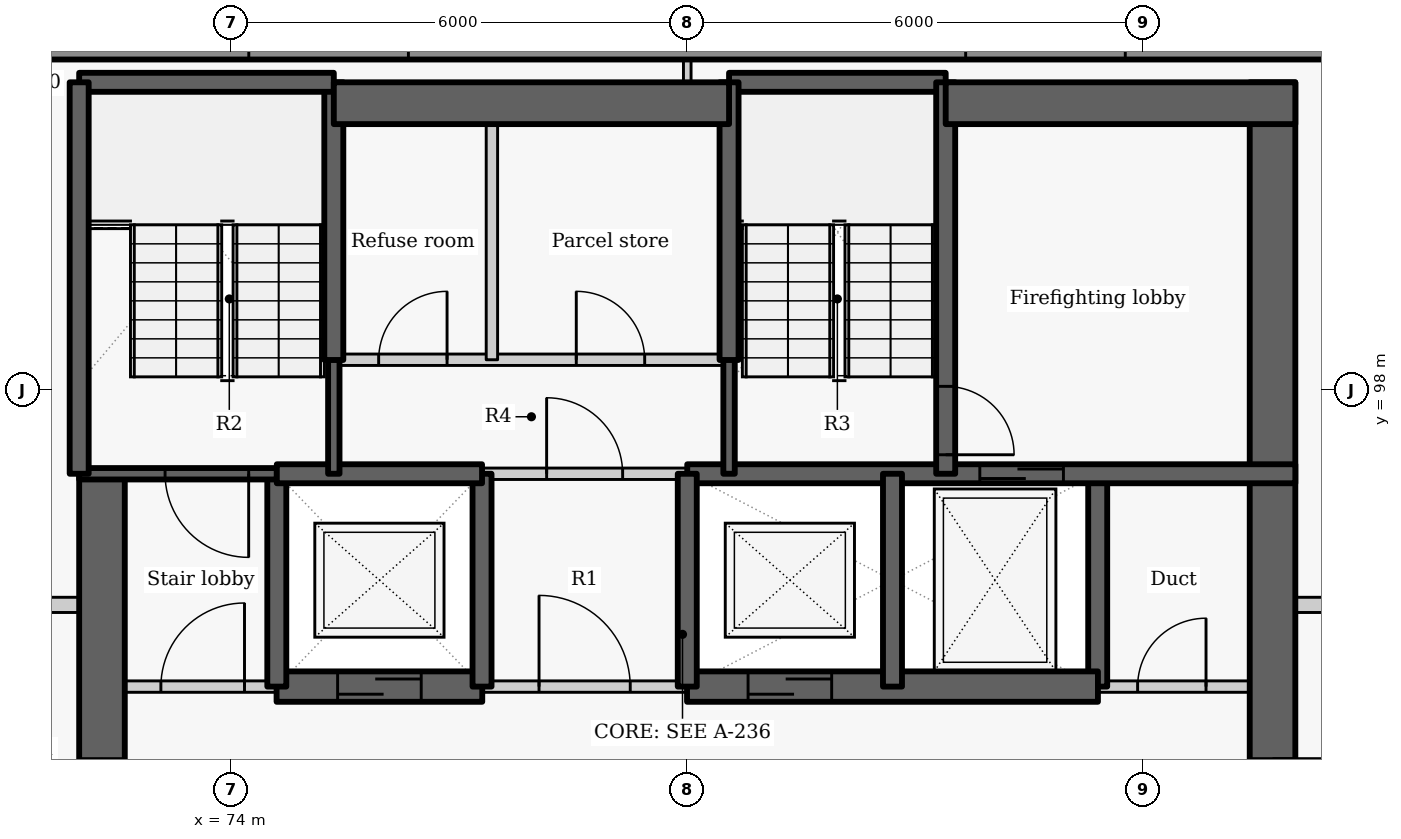
"""IFC4 building model, lengths in metres.
Left out: names, types, materials, properties, quantities, classifications, styles, units other than length and angle.
Written with IfcOpenShell. Run it as: python <this file> out.ifc"""

import sys

from ifc_helpers import new_model, si_unit, direction, frame, frame_2d, origin, place, context, subcontext, project, spatial, rectangle, extrude, element, fill, save


model = new_model("IFC4")
c1 = context("Model", 3, precision=1e-05, world=origin(), true_north=direction((0.0, 1.0)))
c2 = subcontext(c1, "Body", "Model", "MODEL_VIEW")
j1 = project(units=[si_unit("LENGTHUNIT", "METRE"), si_unit("PLANEANGLEUNIT", "RADIAN")], contexts=[c1])
p1 = place(None, origin())
s1 = spatial("IfcSite", under=j1, at=p1, CompositionType="ELEMENT")
p2 = place(p1, origin())
s2 = spatial("IfcBuilding", under=s1, at=p2, CompositionType="ELEMENT")
p3 = place(p2, frame((0.0, 0.0, 213.0)))
s3 = spatial("IfcBuildingStorey", under=s2, at=p3, CompositionType="ELEMENT", Elevation=213.0)
p4 = place(p3, frame((89.449, 102.5, 0.0), z_axis=(0.0, 0.0, 1.0), x_axis=(-1.0, 0.0, 0.0)))
e1 = element("IfcWall", 1, at=p4, inside=s3, PredefinedType="SOLIDWALL", context=c2, shape_type="SweptSolid", body=[
    extrude(rectangle(XDim=18.933, YDim=0.3, at=frame_2d((9.466, 0.0))), origin(), (0.0, 0.0, 1.0), 2.425),
])
p5 = place(p4, frame((3.687, 0.0, 0.9)))
e2 = element("IfcOpeningElement", 2, at=p5, cuts=e1, PredefinedType="OPENING", context=c2, shape_type="SweptSolid", body=[
    extrude(rectangle(XDim=2.1, YDim=1.1, at=frame_2d((1.05, 0.55))), frame((0.0, 0.16, 0.0), z_axis=(0.0, -1.0, 0.0), x_axis=(1.0, 0.0, 0.0)), (0.0, 0.0, 1.0), 0.32),
])
p6 = place(p4, frame((13.118, 0.0, 0.9)))
e3 = element("IfcOpeningElement", 3, at=p6, cuts=e1, PredefinedType="OPENING", context=c2, shape_type="SweptSolid", body=[
    extrude(rectangle(XDim=2.1, YDim=1.1, at=frame_2d((1.05, 0.55))), frame((0.0, 0.16, 0.0), z_axis=(0.0, -1.0, 0.0), x_axis=(1.0, 0.0, 0.0)), (0.0, 0.0, 1.0), 0.32),
])
p7 = place(p3, frame((72.3, 87.8, -0.275), z_axis=(0.0, 0.0, 1.0), x_axis=(0.0, 1.0, 0.0)))
e4 = element("IfcWall", 4, at=p7, inside=s3, PredefinedType="SHEAR", context=c2, shape_type="SweptSolid", body=[
    extrude(rectangle(XDim=9.1, YDim=0.6, at=frame_2d((4.55, 0.0))), origin(), (0.0, 0.0, 1.0), 3.3),
])
p8 = place(p7, frame((3.852, 0.0, 0.275)))
e5 = element("IfcOpeningElement", 5, at=p8, cuts=e4, PredefinedType="OPENING", context=c2, shape_type="SweptSolid", body=[
    extrude(rectangle(XDim=1.5, YDim=2.1, at=frame_2d((0.75, 1.05))), frame((0.0, 0.31, 0.0), z_axis=(0.0, -1.0, 0.0), x_axis=(1.0, 0.0, 0.0)), (0.0, 0.0, 1.0), 0.62),
])
p9 = place(p3, frame((85.4, 94.1, -0.275), z_axis=(0.0, 0.0, 1.0), x_axis=(0.0, 1.0, 0.0)))
e6 = element("IfcWall", 6, at=p9, inside=s3, PredefinedType="SHEAR", context=c2, shape_type="SweptSolid", body=[
    extrude(rectangle(XDim=2.8, YDim=0.25, at=frame_2d((1.4, 0.0))), origin(), (0.0, 0.0, 1.0), 3.3),
])
p10 = place(p3, frame((87.7, 102.05, -0.275), z_axis=(0.0, 0.0, 1.0), x_axis=(0.0, -1.0, 0.0)))
e7 = element("IfcWall", 7, at=p10, inside=s3, PredefinedType="SHEAR", context=c2, shape_type="SweptSolid", body=[
    extrude(rectangle(XDim=14.25, YDim=0.6, at=frame_2d((7.125, 0.0))), origin(), (0.0, 0.0, 1.0), 3.3),
])
p11 = place(p10, frame((8.898, 0.0, 0.275)))
e8 = element("IfcOpeningElement", 8, at=p11, cuts=e7, PredefinedType="OPENING", context=c2, shape_type="SweptSolid", body=[
    extrude(rectangle(XDim=1.5, YDim=2.1, at=frame_2d((0.75, 1.05))), frame((0.0, 0.31, 0.0), z_axis=(0.0, -1.0, 0.0), x_axis=(1.0, 0.0, 0.0)), (0.0, 0.0, 1.0), 0.62),
])
p12 = place(p3, frame((72.0, 94.1, 0.0), z_axis=(0.0, 0.0, 1.0), x_axis=(1.0, 0.0, 0.0)))
e9 = element("IfcWall", 9, at=p12, inside=s3, PredefinedType="PARTITIONING", context=c2, shape_type="SweptSolid", body=[
    extrude(rectangle(XDim=2.603, YDim=0.15, at=frame_2d((1.302, 0.0))), origin(), (0.0, 0.0, 1.0), 3.025),
])
p13 = place(p12, frame((1.075, 0.0, 0.0)))
e10 = element("IfcOpeningElement", 10, at=p13, cuts=e9, PredefinedType="OPENING", context=c2, shape_type="SweptSolid", body=[
    extrude(rectangle(XDim=1.1, YDim=2.1, at=frame_2d((0.55, 1.05))), frame((0.0, 0.085, 0.0), z_axis=(0.0, -1.0, 0.0), x_axis=(1.0, 0.0, 0.0)), (0.0, 0.0, 1.0), 0.17),
])
p14 = place(p3, frame((77.297, 94.1, 0.0), z_axis=(0.0, 0.0, 1.0), x_axis=(1.0, 0.0, 0.0)))
e11 = element("IfcWall", 11, at=p14, inside=s3, PredefinedType="PARTITIONING", context=c2, shape_type="SweptSolid", body=[
    extrude(rectangle(XDim=2.706, YDim=0.15, at=frame_2d((1.353, 0.0))), origin(), (0.0, 0.0, 1.0), 3.025),
])
p15 = place(p14, frame((0.753, 0.0, 0.0)))
e12 = element("IfcOpeningElement", 12, at=p15, cuts=e11, PredefinedType="OPENING", context=c2, shape_type="SweptSolid", body=[
    extrude(rectangle(XDim=1.2, YDim=2.1, at=frame_2d((0.6, 1.05))), frame((0.0, 0.085, 0.0), z_axis=(0.0, -1.0, 0.0), x_axis=(1.0, 0.0, 0.0)), (0.0, 0.0, 1.0), 0.17),
])
p16 = place(p3, frame((85.397, 94.1, 0.0), z_axis=(0.0, 0.0, 1.0), x_axis=(1.0, 0.0, 0.0)))
e13 = element("IfcWall", 13, at=p16, inside=s3, PredefinedType="PARTITIONING", context=c2, shape_type="SweptSolid", body=[
    extrude(rectangle(XDim=2.603, YDim=0.15, at=frame_2d((1.302, 0.0))), origin(), (0.0, 0.0, 1.0), 3.025),
])
p17 = place(p16, frame((0.528, 0.0, 0.0)))
e14 = element("IfcOpeningElement", 14, at=p17, cuts=e13, PredefinedType="OPENING", context=c2, shape_type="SweptSolid", body=[
    extrude(rectangle(XDim=0.9, YDim=2.1, at=frame_2d((0.45, 1.05))), frame((0.0, 0.085, 0.0), z_axis=(0.0, -1.0, 0.0), x_axis=(1.0, 0.0, 0.0)), (0.0, 0.0, 1.0), 0.17),
])
p18 = place(p3, frame((74.597, 94.1, -0.275), z_axis=(0.0, 0.0, 1.0), x_axis=(1.0, 0.0, 0.0)))
e15 = element("IfcWall", 15, at=p18, inside=s3, PredefinedType="SHEAR", context=c2, shape_type="SweptSolid", body=[
    extrude(rectangle(XDim=2.706, YDim=0.4, at=frame_2d((1.353, 0.0))), origin(), (0.0, 0.0, 1.0), 3.3),
])
p19 = place(p18, frame((0.803, 0.0, 0.275)))
e16 = element("IfcOpeningElement", 16, at=p19, cuts=e15, PredefinedType="OPENING", context=c2, shape_type="SweptSolid", body=[
    extrude(rectangle(XDim=1.1, YDim=2.1, at=frame_2d((0.55, 1.05))), frame((0.0, 0.21, 0.0), z_axis=(0.0, -1.0, 0.0), x_axis=(1.0, 0.0, 0.0)), (0.0, 0.0, 1.0), 0.42),
])
p20 = place(p3, frame((79.997, 94.1, -0.275), z_axis=(0.0, 0.0, 1.0), x_axis=(1.0, 0.0, 0.0)))
e17 = element("IfcWall", 17, at=p20, inside=s3, PredefinedType="SHEAR", context=c2, shape_type="SweptSolid", body=[
    extrude(rectangle(XDim=5.406, YDim=0.4, at=frame_2d((2.703, 0.0))), origin(), (0.0, 0.0, 1.0), 3.3),
])
p21 = place(p20, frame((0.803, 0.0, 0.275)))
e18 = element("IfcOpeningElement", 18, at=p21, cuts=e17, PredefinedType="OPENING", context=c2, shape_type="SweptSolid", body=[
    extrude(rectangle(XDim=1.1, YDim=2.1, at=frame_2d((0.55, 1.05))), frame((0.0, 0.21, 0.0), z_axis=(0.0, -1.0, 0.0), x_axis=(1.0, 0.0, 0.0)), (0.0, 0.0, 1.0), 0.42),
])
p22 = place(p3, frame((74.6, 94.1, -0.275), z_axis=(0.0, 0.0, 1.0), x_axis=(0.0, 1.0, 0.0)))
e19 = element("IfcWall", 19, at=p22, inside=s3, PredefinedType="SHEAR", context=c2, shape_type="SweptSolid", body=[
    extrude(rectangle(XDim=2.8, YDim=0.25, at=frame_2d((1.4, 0.0))), origin(), (0.0, 0.0, 1.0), 3.3),
])
p23 = place(p3, frame((74.6, 96.9, -0.275), z_axis=(0.0, 0.0, 1.0), x_axis=(-1.0, 0.0, 0.0)))
e20 = element("IfcWall", 20, at=p23, inside=s3, PredefinedType="SHEAR", context=c2, shape_type="SweptSolid", body=[
    extrude(rectangle(XDim=2.6, YDim=0.15, at=frame_2d((1.3, 0.0))), origin(), (0.0, 0.0, 1.0), 3.3),
])
p24 = place(p23, frame((0.37, 0.0, 0.275)))
e21 = element("IfcOpeningElement", 21, at=p24, cuts=e20, PredefinedType="OPENING", context=c2, shape_type="SweptSolid", body=[
    extrude(rectangle(XDim=1.1, YDim=2.1, at=frame_2d((0.55, 1.05))), frame((0.0, 0.085, 0.0), z_axis=(0.0, -1.0, 0.0), x_axis=(1.0, 0.0, 0.0)), (0.0, 0.0, 1.0), 0.17),
])
p25 = place(p3, frame((77.3, 94.1, -0.275), z_axis=(0.0, 0.0, 1.0), x_axis=(0.0, 1.0, 0.0)))
e22 = element("IfcWall", 22, at=p25, inside=s3, PredefinedType="SHEAR", context=c2, shape_type="SweptSolid", body=[
    extrude(rectangle(XDim=2.8, YDim=0.25, at=frame_2d((1.4, 0.0))), origin(), (0.0, 0.0, 1.0), 3.3),
])
p26 = place(p3, frame((74.6, 96.9, -0.275), z_axis=(0.0, 0.0, 1.0), x_axis=(1.0, 0.0, 0.0)))
e23 = element("IfcWall", 23, at=p26, inside=s3, PredefinedType="SHEAR", context=c2, shape_type="SweptSolid", body=[
    extrude(rectangle(XDim=2.7, YDim=0.25, at=frame_2d((1.35, 0.0))), origin(), (0.0, 0.0, 1.0), 3.3),
])
p27 = place(p3, frame((80.0, 96.9, -0.275), z_axis=(0.0, 0.0, 1.0), x_axis=(1.0, 0.0, 0.0)))
e24 = element("IfcWall", 24, at=p27, inside=s3, PredefinedType="SHEAR", context=c2, shape_type="SweptSolid", body=[
    extrude(rectangle(XDim=8.0, YDim=0.25, at=frame_2d((4.0, 0.0))), origin(), (0.0, 0.0, 1.0), 3.3),
])
p28 = place(p27, frame((3.849, 0.0, 0.275)))
e25 = element("IfcOpeningElement", 25, at=p28, cuts=e24, PredefinedType="OPENING", context=c2, shape_type="SweptSolid", body=[
    extrude(rectangle(XDim=1.1, YDim=2.1, at=frame_2d((0.55, 1.05))), frame((0.0, 0.135, 0.0), z_axis=(0.0, -1.0, 0.0), x_axis=(1.0, 0.0, 0.0)), (0.0, 0.0, 1.0), 0.27),
])
p29 = place(p3, frame((80.0, 94.1, -0.275), z_axis=(0.0, 0.0, 1.0), x_axis=(0.0, 1.0, 0.0)))
e26 = element("IfcWall", 26, at=p29, inside=s3, PredefinedType="SHEAR", context=c2, shape_type="SweptSolid", body=[
    extrude(rectangle(XDim=2.8, YDim=0.25, at=frame_2d((1.4, 0.0))), origin(), (0.0, 0.0, 1.0), 3.3),
])
p30 = place(p3, frame((77.3, 96.9, 0.0), z_axis=(0.0, 0.0, 1.0), x_axis=(1.0, 0.0, 0.0)))
e27 = element("IfcWall", 27, at=p30, inside=s3, PredefinedType="PARTITIONING", context=c2, shape_type="SweptSolid", body=[
    extrude(rectangle(XDim=2.7, YDim=0.15, at=frame_2d((1.35, 0.0))), origin(), (0.0, 0.0, 1.0), 3.025),
])
p31 = place(p30, frame((0.85, 0.0, 0.0)))
e28 = element("IfcOpeningElement", 28, at=p31, cuts=e27, PredefinedType="OPENING", context=c2, shape_type="SweptSolid", body=[
    extrude(rectangle(XDim=1.0, YDim=2.1, at=frame_2d((0.5, 1.05))), frame((0.0, 0.085, 0.0), z_axis=(0.0, -1.0, 0.0), x_axis=(1.0, 0.0, 0.0)), (0.0, 0.0, 1.0), 0.17),
])
p32 = place(p3, frame((82.7, 94.1, -0.275), z_axis=(0.0, 0.0, 1.0), x_axis=(0.0, 1.0, 0.0)))
e29 = element("IfcWall", 29, at=p32, inside=s3, PredefinedType="SHEAR", context=c2, shape_type="SweptSolid", body=[
    extrude(rectangle(XDim=2.8, YDim=0.25, at=frame_2d((1.4, 0.0))), origin(), (0.0, 0.0, 1.0), 3.3),
])
p33 = place(p3, frame((75.35, 96.9, -0.275), z_axis=(0.0, 0.0, 1.0), x_axis=(0.0, 1.0, 0.0)))
e30 = element("IfcWall", 30, at=p33, inside=s3, PredefinedType="SHEAR", context=c2, shape_type="SweptSolid", body=[
    extrude(rectangle(XDim=1.503, YDim=0.15, at=frame_2d((0.751, 0.0))), origin(), (0.0, 0.0, 1.0), 3.3),
])
p34 = place(p3, frame((75.35, 98.397, -0.275), z_axis=(0.0, 0.0, 1.0), x_axis=(0.0, 1.0, 0.0)))
e31 = element("IfcWall", 31, at=p34, inside=s3, PredefinedType="SHEAR", context=c2, shape_type="SweptSolid", body=[
    extrude(rectangle(XDim=3.653, YDim=0.25, at=frame_2d((1.827, 0.0))), origin(), (0.0, 0.0, 1.0), 3.3),
])
p35 = place(p3, frame((72.0, 102.05, -0.275), z_axis=(0.0, 0.0, 1.0), x_axis=(1.0, 0.0, 0.0)))
e32 = element("IfcWall", 32, at=p35, inside=s3, PredefinedType="SHEAR", context=c2, shape_type="SweptSolid", body=[
    extrude(rectangle(XDim=3.35, YDim=0.25, at=frame_2d((1.675, 0.0))), origin(), (0.0, 0.0, 1.0), 3.3),
])
p36 = place(p3, frame((80.55, 102.05, -0.275), z_axis=(0.0, 0.0, 1.0), x_axis=(1.0, 0.0, 0.0)))
e33 = element("IfcWall", 33, at=p36, inside=s3, PredefinedType="SHEAR", context=c2, shape_type="SweptSolid", body=[
    extrude(rectangle(XDim=2.85, YDim=0.25, at=frame_2d((1.425, 0.0))), origin(), (0.0, 0.0, 1.0), 3.3),
])
p37 = place(p3, frame((72.0, 96.9, -0.275), z_axis=(0.0, 0.0, 1.0), x_axis=(0.0, 1.0, 0.0)))
e34 = element("IfcWall", 34, at=p37, inside=s3, PredefinedType="SHEAR", context=c2, shape_type="SweptSolid", body=[
    extrude(rectangle(XDim=5.15, YDim=0.25, at=frame_2d((2.575, 0.0))), origin(), (0.0, 0.0, 1.0), 3.3),
])
p38 = place(p3, frame((83.4, 102.05, -0.275), z_axis=(0.0, 0.0, 1.0), x_axis=(0.0, -1.0, 0.0)))
e35 = element("IfcWall", 35, at=p38, inside=s3, PredefinedType="SHEAR", context=c2, shape_type="SweptSolid", body=[
    extrude(rectangle(XDim=5.15, YDim=0.25, at=frame_2d((2.575, 0.0))), origin(), (0.0, 0.0, 1.0), 3.3),
])
p39 = place(p38, frame((4.0, 0.0, 0.275)))
e36 = element("IfcOpeningElement", 36, at=p39, cuts=e35, PredefinedType="OPENING", context=c2, shape_type="SweptSolid", body=[
    extrude(rectangle(XDim=0.9, YDim=2.1, at=frame_2d((0.45, 1.05))), frame((0.0, 0.135, 0.0), z_axis=(0.0, -1.0, 0.0), x_axis=(1.0, 0.0, 0.0)), (0.0, 0.0, 1.0), 0.27),
])
p40 = place(p3, frame((80.55, 96.9, -0.275), z_axis=(0.0, 0.0, 1.0), x_axis=(0.0, 1.0, 0.0)))
e37 = element("IfcWall", 37, at=p40, inside=s3, PredefinedType="SHEAR", context=c2, shape_type="SweptSolid", body=[
    extrude(rectangle(XDim=1.503, YDim=0.15, at=frame_2d((0.751, 0.0))), origin(), (0.0, 0.0, 1.0), 3.3),
])
p41 = place(p3, frame((80.55, 98.397, -0.275), z_axis=(0.0, 0.0, 1.0), x_axis=(0.0, 1.0, 0.0)))
e38 = element("IfcWall", 38, at=p41, inside=s3, PredefinedType="SHEAR", context=c2, shape_type="SweptSolid", body=[
    extrude(rectangle(XDim=3.653, YDim=0.25, at=frame_2d((1.827, 0.0))), origin(), (0.0, 0.0, 1.0), 3.3),
])
p42 = place(p3, frame((75.35, 101.775, -0.275), z_axis=(0.0, 0.0, 1.0), x_axis=(1.0, 0.0, 0.0)))
e39 = element("IfcWall", 39, at=p42, inside=s3, PredefinedType="SHEAR", context=c2, shape_type="SweptSolid", body=[
    extrude(rectangle(XDim=5.2, YDim=0.55, at=frame_2d((2.6, 0.0))), origin(), (0.0, 0.0, 1.0), 3.3),
])
p43 = place(p3, frame((83.4, 101.775, -0.275), z_axis=(0.0, 0.0, 1.0), x_axis=(1.0, 0.0, 0.0)))
e40 = element("IfcWall", 40, at=p43, inside=s3, PredefinedType="SHEAR", context=c2, shape_type="SweptSolid", body=[
    extrude(rectangle(XDim=4.6, YDim=0.55, at=frame_2d((2.3, 0.0))), origin(), (0.0, 0.0, 1.0), 3.3),
])
p44 = place(p3, frame((75.35, 98.4, 0.0), z_axis=(0.0, 0.0, 1.0), x_axis=(1.0, 0.0, 0.0)))
e41 = element("IfcWall", 41, at=p44, inside=s3, PredefinedType="PARTITIONING", context=c2, shape_type="SweptSolid", body=[
    extrude(rectangle(XDim=5.2, YDim=0.15, at=frame_2d((2.6, 0.0))), origin(), (0.0, 0.0, 1.0), 3.025),
])
p45 = place(p44, frame((0.59, 0.0, 0.0)))
e42 = element("IfcOpeningElement", 42, at=p45, cuts=e41, PredefinedType="OPENING", context=c2, shape_type="SweptSolid", body=[
    extrude(rectangle(XDim=0.9, YDim=2.1, at=frame_2d((0.45, 1.05))), frame((0.0, 0.085, 0.0), z_axis=(0.0, -1.0, 0.0), x_axis=(1.0, 0.0, 0.0)), (0.0, 0.0, 1.0), 0.17),
])
p46 = place(p44, frame((3.19, 0.0, 0.0)))
e43 = element("IfcOpeningElement", 43, at=p46, cuts=e41, PredefinedType="OPENING", context=c2, shape_type="SweptSolid", body=[
    extrude(rectangle(XDim=0.9, YDim=2.1, at=frame_2d((0.45, 1.05))), frame((0.0, 0.085, 0.0), z_axis=(0.0, -1.0, 0.0), x_axis=(1.0, 0.0, 0.0)), (0.0, 0.0, 1.0), 0.17),
])
p47 = place(p3, frame((77.43, 98.4, 0.0), z_axis=(0.0, 0.0, 1.0), x_axis=(0.0, 1.0, 0.0)))
e44 = element("IfcWall", 44, at=p47, inside=s3, PredefinedType="PARTITIONING", context=c2, shape_type="SweptSolid", body=[
    extrude(rectangle(XDim=3.65, YDim=0.15, at=frame_2d((1.825, 0.0))), origin(), (0.0, 0.0, 1.0), 3.025),
])
p48 = place(p3, frame((69.587, 95.175, 0.0), z_axis=(0.0, 0.0, 1.0), x_axis=(1.0, 0.0, 0.0)))
e45 = element("IfcWall", 45, at=p48, inside=s3, PredefinedType="PARTITIONING", context=c2, shape_type="SweptSolid", body=[
    extrude(rectangle(XDim=2.413, YDim=0.2, at=frame_2d((1.207, 0.0))), origin(), (0.0, 0.0, 1.0), 2.505),
])
p49 = place(p3, frame((88.0, 95.175, 0.0), z_axis=(0.0, 0.0, 1.0), x_axis=(1.0, 0.0, 0.0)))
e46 = element("IfcWall", 46, at=p49, inside=s3, PredefinedType="PARTITIONING", context=c2, shape_type="SweptSolid", body=[
    extrude(rectangle(XDim=1.473, YDim=0.2, at=frame_2d((0.736, 0.0))), origin(), (0.0, 0.0, 1.0), 3.025),
])
p50 = place(p3, frame((80.0, 102.05, 0.0), z_axis=(0.0, 0.0, 1.0), x_axis=(0.0, 1.0, 0.0)))
e47 = element("IfcWall", 47, at=p50, inside=s3, PredefinedType="PARTITIONING", context=c2, shape_type="SweptSolid", body=[
    extrude(rectangle(XDim=0.3, YDim=0.1, at=frame_2d((0.15, 0.0))), origin(), (0.0, 0.0, 1.0), 3.025),
])
p51 = place(p13, origin())
e48 = element("IfcDoor", 48, at=p51, inside=s3, OperationType="SINGLE_SWING_RIGHT", PredefinedType="DOOR", context=c2, shape_type="SweptSolid", body=[
    extrude(rectangle(XDim=1.1, YDim=2.1, at=frame_2d((0.55, 1.05))), frame((0.0, 0.025, 0.0), z_axis=(0.0, -1.0, 0.0), x_axis=(1.0, 0.0, 0.0)), (0.0, 0.0, 1.0), 0.05),
])
fill(e10, e48)
p52 = place(p19, origin())
e49 = element("IfcDoor", 49, at=p52, inside=s3, OperationType="SLIDING_TO_LEFT", PredefinedType="DOOR", context=c2, shape_type="SweptSolid", body=[
    extrude(rectangle(XDim=1.1, YDim=2.1, at=frame_2d((0.55, 1.05))), frame((0.0, 0.025, 0.0), z_axis=(0.0, -1.0, 0.0), x_axis=(1.0, 0.0, 0.0)), (0.0, 0.0, 1.0), 0.05),
])
fill(e16, e49)
p53 = place(p15, origin())
e50 = element("IfcDoor", 50, at=p53, inside=s3, OperationType="DOUBLE_DOOR_SINGLE_SWING", PredefinedType="DOOR", context=c2, shape_type="SweptSolid", body=[
    extrude(rectangle(XDim=1.2, YDim=2.1, at=frame_2d((0.6, 1.05))), frame((0.0, 0.025, 0.0), z_axis=(0.0, -1.0, 0.0), x_axis=(1.0, 0.0, 0.0)), (0.0, 0.0, 1.0), 0.05),
])
fill(e12, e50)
p54 = place(p21, origin())
e51 = element("IfcDoor", 51, at=p54, inside=s3, OperationType="SLIDING_TO_LEFT", PredefinedType="DOOR", context=c2, shape_type="SweptSolid", body=[
    extrude(rectangle(XDim=1.1, YDim=2.1, at=frame_2d((0.55, 1.05))), frame((0.0, 0.025, 0.0), z_axis=(0.0, -1.0, 0.0), x_axis=(1.0, 0.0, 0.0)), (0.0, 0.0, 1.0), 0.05),
])
fill(e18, e51)
p55 = place(p28, origin())
e52 = element("IfcDoor", 52, at=p55, inside=s3, OperationType="SLIDING_TO_LEFT", PredefinedType="DOOR", context=c2, shape_type="SweptSolid", body=[
    extrude(rectangle(XDim=1.1, YDim=2.1, at=frame_2d((0.55, 1.05))), frame((0.0, 0.025, 0.0), z_axis=(0.0, -1.0, 0.0), x_axis=(1.0, 0.0, 0.0)), (0.0, 0.0, 1.0), 0.05),
])
fill(e25, e52)
p56 = place(p17, origin())
e53 = element("IfcDoor", 53, at=p56, inside=s3, OperationType="SINGLE_SWING_RIGHT", PredefinedType="DOOR", context=c2, shape_type="SweptSolid", body=[
    extrude(rectangle(XDim=0.9, YDim=2.1, at=frame_2d((0.45, 1.05))), frame((0.0, 0.025, 0.0), z_axis=(0.0, -1.0, 0.0), x_axis=(1.0, 0.0, 0.0)), (0.0, 0.0, 1.0), 0.05),
])
fill(e14, e53)
p57 = place(p31, origin())
e54 = element("IfcDoor", 54, at=p57, inside=s3, OperationType="SINGLE_SWING_LEFT", PredefinedType="DOOR", context=c2, shape_type="SweptSolid", body=[
    extrude(rectangle(XDim=1.0, YDim=2.1, at=frame_2d((0.5, 1.05))), frame((0.0, 0.025, 0.0), z_axis=(0.0, -1.0, 0.0), x_axis=(1.0, 0.0, 0.0)), (0.0, 0.0, 1.0), 0.05),
])
fill(e28, e54)
p58 = place(p45, origin())
e55 = element("IfcDoor", 55, at=p58, inside=s3, OperationType="SINGLE_SWING_RIGHT", PredefinedType="DOOR", context=c2, shape_type="SweptSolid", body=[
    extrude(rectangle(XDim=0.9, YDim=2.1, at=frame_2d((0.45, 1.05))), frame((0.0, 0.025, 0.0), z_axis=(0.0, -1.0, 0.0), x_axis=(1.0, 0.0, 0.0)), (0.0, 0.0, 1.0), 0.05),
])
fill(e42, e55)
p59 = place(p46, origin())
e56 = element("IfcDoor", 56, at=p59, inside=s3, OperationType="SINGLE_SWING_LEFT", PredefinedType="DOOR", context=c2, shape_type="SweptSolid", body=[
    extrude(rectangle(XDim=0.9, YDim=2.1, at=frame_2d((0.45, 1.05))), frame((0.0, 0.025, 0.0), z_axis=(0.0, -1.0, 0.0), x_axis=(1.0, 0.0, 0.0)), (0.0, 0.0, 1.0), 0.05),
])
fill(e43, e56)
p60 = place(p24, origin())
e57 = element("IfcDoor", 57, at=p60, inside=s3, OperationType="SINGLE_SWING_LEFT", PredefinedType="DOOR", context=c2, shape_type="SweptSolid", body=[
    extrude(rectangle(XDim=1.1, YDim=2.1, at=frame_2d((0.55, 1.05))), frame((0.0, 0.025, 0.0), z_axis=(0.0, -1.0, 0.0), x_axis=(1.0, 0.0, 0.0)), (0.0, 0.0, 1.0), 0.05),
])
fill(e21, e57)
p61 = place(p39, origin())
e58 = element("IfcDoor", 58, at=p61, inside=s3, OperationType="SINGLE_SWING_RIGHT", PredefinedType="DOOR", context=c2, shape_type="SweptSolid", body=[
    extrude(rectangle(XDim=0.9, YDim=2.1, at=frame_2d((0.45, 1.05))), frame((0.0, 0.025, 0.0), z_axis=(0.0, -1.0, 0.0), x_axis=(1.0, 0.0, 0.0)), (0.0, 0.0, 1.0), 0.05),
])
fill(e36, e58)
p62 = place(p11, origin())
e59 = element("IfcDoor", 59, at=p62, inside=s3, OperationType="DOUBLE_DOOR_SINGLE_SWING", PredefinedType="DOOR", context=c2, shape_type="SweptSolid", body=[
    extrude(rectangle(XDim=1.5, YDim=2.1, at=frame_2d((0.75, 1.05))), frame((0.0, 0.025, 0.0), z_axis=(0.0, -1.0, 0.0), x_axis=(1.0, 0.0, 0.0)), (0.0, 0.0, 1.0), 0.05),
])
fill(e8, e59)
p63 = place(p8, origin())
e60 = element("IfcDoor", 60, at=p63, inside=s3, OperationType="DOUBLE_DOOR_SINGLE_SWING", PredefinedType="DOOR", context=c2, shape_type="SweptSolid", body=[
    extrude(rectangle(XDim=1.5, YDim=2.1, at=frame_2d((0.75, 1.05))), frame((0.0, 0.025, 0.0), z_axis=(0.0, -1.0, 0.0), x_axis=(1.0, 0.0, 0.0)), (0.0, 0.0, 1.0), 0.05),
])
fill(e5, e60)
save(model, sys.argv[1])
